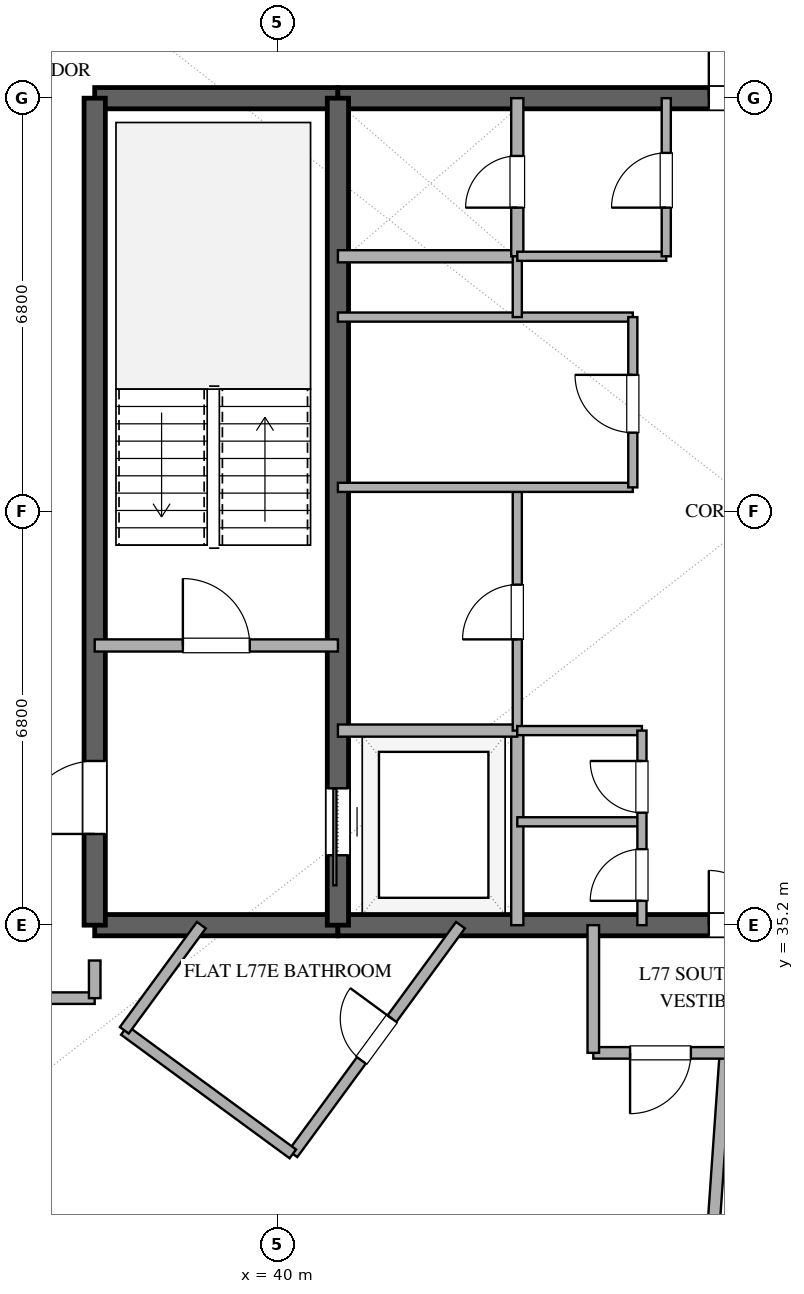
"""IFC4 building model, lengths in metres.
Left out: names, types, materials, properties, quantities, classifications, styles, units other than length and angle.
Written with IfcOpenShell. Run it as: python <this file> out.ifc"""

import sys

from ifc_helpers import new_model, si_unit, direction, frame, frame_2d, origin, place, context, subcontext, project, spatial, rectangle, extrude, element, fill, save


model = new_model("IFC4")
c1 = context("Model", 3, precision=1e-05, world=origin(), true_north=direction((0.0, 1.0)))
c2 = subcontext(c1, "Body", "Model", "MODEL_VIEW")
j1 = project(units=[si_unit("LENGTHUNIT", "METRE"), si_unit("PLANEANGLEUNIT", "RADIAN")], contexts=[c1])
p1 = place(None, origin())
s1 = spatial("IfcSite", under=j1, at=p1, CompositionType="ELEMENT")
p2 = place(p1, origin())
s2 = spatial("IfcBuilding", under=s1, at=p2, CompositionType="ELEMENT")
p3 = place(p2, frame((0.0, 0.0, 298.2)))
s3 = spatial("IfcBuildingStorey", under=s2, at=p3, CompositionType="ELEMENT", Elevation=298.2)
p4 = place(p3, frame((37.0, 35.2, 0.0), z_axis=(0.0, 0.0, 1.0), x_axis=(1.0, 0.0, 0.0)))
e1 = element("IfcWall", 1, at=p4, inside=s3, PredefinedType="SHEAR", context=c2, shape_type="SweptSolid", body=[
    extrude(rectangle(XDim=4.0, YDim=0.35, at=frame_2d((2.0, 0.0))), origin(), (0.0, 0.0, 1.0), 3.37),
])
p5 = place(p3, frame((41.0, 35.2, 0.0), z_axis=(0.0, 0.0, 1.0), x_axis=(1.0, 0.0, 0.0)))
e2 = element("IfcWall", 2, at=p5, inside=s3, PredefinedType="SHEAR", context=c2, shape_type="SweptSolid", body=[
    extrude(rectangle(XDim=14.0, YDim=0.35, at=frame_2d((7.0, 0.0))), origin(), (0.0, 0.0, 1.0), 3.37),
])
p6 = place(p5, frame((6.1, 0.0, 0.0)))
e3 = element("IfcOpeningElement", 3, at=p6, cuts=e2, PredefinedType="OPENING", context=c2, shape_type="SweptSolid", body=[
    extrude(rectangle(XDim=1.8, YDim=2.25, at=frame_2d((0.9, 1.125))), frame((0.0, 0.185, 0.0), z_axis=(0.0, -1.0, 0.0), x_axis=(1.0, 0.0, 0.0)), (0.0, 0.0, 1.0), 0.37),
])
p7 = place(p3, frame((37.0, 48.8, 0.0), z_axis=(0.0, 0.0, 1.0), x_axis=(1.0, 0.0, 0.0)))
e4 = element("IfcWall", 4, at=p7, inside=s3, PredefinedType="SHEAR", context=c2, shape_type="SweptSolid", body=[
    extrude(rectangle(XDim=4.0, YDim=0.35, at=frame_2d((2.0, 0.0))), origin(), (0.0, 0.0, 1.0), 3.37),
])
p8 = place(p3, frame((41.0, 48.8, 0.0), z_axis=(0.0, 0.0, 1.0), x_axis=(1.0, 0.0, 0.0)))
e5 = element("IfcWall", 5, at=p8, inside=s3, PredefinedType="SHEAR", context=c2, shape_type="SweptSolid", body=[
    extrude(rectangle(XDim=14.0, YDim=0.35, at=frame_2d((7.0, 0.0))), origin(), (0.0, 0.0, 1.0), 3.37),
])
p9 = place(p8, frame((6.1, 0.0, 0.0)))
e6 = element("IfcOpeningElement", 6, at=p9, cuts=e5, PredefinedType="OPENING", context=c2, shape_type="SweptSolid", body=[
    extrude(rectangle(XDim=1.8, YDim=2.25, at=frame_2d((0.9, 1.125))), frame((0.0, 0.185, 0.0), z_axis=(0.0, -1.0, 0.0), x_axis=(1.0, 0.0, 0.0)), (0.0, 0.0, 1.0), 0.37),
])
p10 = place(p3, frame((37.0, 35.2, 0.0), z_axis=(0.0, 0.0, 1.0), x_axis=(0.0, 1.0, 0.0)))
e7 = element("IfcWall", 7, at=p10, inside=s3, PredefinedType="SHEAR", context=c2, shape_type="SweptSolid", body=[
    extrude(rectangle(XDim=13.6, YDim=0.35, at=frame_2d((6.8, 0.0))), origin(), (0.0, 0.0, 1.0), 3.37),
])
p11 = place(p10, frame((1.5, 0.0, 0.0)))
e8 = element("IfcOpeningElement", 8, at=p11, cuts=e7, PredefinedType="OPENING", context=c2, shape_type="SweptSolid", body=[
    extrude(rectangle(XDim=1.2, YDim=2.15, at=frame_2d((0.6, 1.075))), frame((0.0, 0.185, 0.0), z_axis=(0.0, -1.0, 0.0), x_axis=(1.0, 0.0, 0.0)), (0.0, 0.0, 1.0), 0.37),
])
p12 = place(p3, frame((41.0, 35.2, 0.0), z_axis=(0.0, 0.0, 1.0), x_axis=(0.0, 1.0, 0.0)))
e9 = element("IfcWall", 9, at=p12, inside=s3, PredefinedType="SHEAR", context=c2, shape_type="SweptSolid", body=[
    extrude(rectangle(XDim=13.6, YDim=0.35, at=frame_2d((6.8, 0.0))), origin(), (0.0, 0.0, 1.0), 3.37),
])
p13 = place(p12, frame((1.15, 0.0, 0.0)))
e10 = element("IfcOpeningElement", 10, at=p13, cuts=e9, PredefinedType="OPENING", context=c2, shape_type="SweptSolid", body=[
    extrude(rectangle(XDim=1.1, YDim=2.2, at=frame_2d((0.55, 1.1))), frame((0.0, 0.185, 0.0), z_axis=(0.0, -1.0, 0.0), x_axis=(1.0, 0.0, 0.0)), (0.0, 0.0, 1.0), 0.37),
])
p14 = place(p3, frame((37.0, 39.8, 0.0), z_axis=(0.0, 0.0, 1.0), x_axis=(1.0, 0.0, 0.0)))
e11 = element("IfcWall", 11, at=p14, inside=s3, PredefinedType="SOLIDWALL", context=c2, shape_type="SweptSolid", body=[
    extrude(rectangle(XDim=4.0, YDim=0.2, at=frame_2d((2.0, 0.0))), origin(), (0.0, 0.0, 1.0), 2.73),
])
p15 = place(p14, frame((1.45, 0.0, 0.0)))
e12 = element("IfcOpeningElement", 12, at=p15, cuts=e11, PredefinedType="OPENING", context=c2, shape_type="SweptSolid", body=[
    extrude(rectangle(XDim=1.1, YDim=2.15, at=frame_2d((0.55, 1.075))), frame((0.0, 0.11, 0.0), z_axis=(0.0, -1.0, 0.0), x_axis=(1.0, 0.0, 0.0)), (0.0, 0.0, 1.0), 0.22),
])
p16 = place(p3, frame((43.95, 35.2, 0.0), z_axis=(0.0, 0.0, 1.0), x_axis=(0.0, 1.0, 0.0)))
e13 = element("IfcWall", 13, at=p16, inside=s3, PredefinedType="SOLIDWALL", context=c2, shape_type="SweptSolid", body=[
    extrude(rectangle(XDim=3.2, YDim=0.2, at=frame_2d((1.6, 0.0))), origin(), (0.0, 0.0, 1.0), 2.73),
])
for number, where, z_axis, x_axis in (
    (14, (41.0, 38.4, 0.0), (0.0, 0.0, 1.0), (1.0, 0.0, 0.0)),
    (15, (41.0, 46.2, 0.0), (0.0, 0.0, 1.0), (1.0, 0.0, 0.0)),
):
    element("IfcWall", number, at=place(p3, frame(where, z_axis=z_axis, x_axis=x_axis)), inside=s3, PredefinedType="SOLIDWALL", context=c2, shape_type="SweptSolid", body=[
        extrude(rectangle(XDim=2.95, YDim=0.2, at=frame_2d((1.475, 0.0))), origin(), (0.0, 0.0, 1.0), 2.73),
    ])
p17 = place(p3, frame((43.95, 46.2, 0.0), z_axis=(0.0, 0.0, 1.0), x_axis=(0.0, 1.0, 0.0)))
e16 = element("IfcWall", 16, at=p17, inside=s3, PredefinedType="SOLIDWALL", context=c2, shape_type="SweptSolid", body=[
    extrude(rectangle(XDim=2.6, YDim=0.2, at=frame_2d((1.3, 0.0))), origin(), (0.0, 0.0, 1.0), 2.73),
])
p18 = place(p17, frame((0.8, 0.0, 0.0)))
e17 = element("IfcOpeningElement", 17, at=p18, cuts=e16, PredefinedType="OPENING", context=c2, shape_type="SweptSolid", body=[
    extrude(rectangle(XDim=0.85, YDim=2.15, at=frame_2d((0.425, 1.075))), frame((0.0, 0.11, 0.0), z_axis=(0.0, -1.0, 0.0), x_axis=(1.0, 0.0, 0.0)), (0.0, 0.0, 1.0), 0.22),
])
p19 = place(p3, frame((43.95, 38.4, 0.0), z_axis=(0.0, 0.0, 1.0), x_axis=(0.0, 1.0, 0.0)))
e18 = element("IfcWall", 18, at=p19, inside=s3, PredefinedType="PARTITIONING", context=c2, shape_type="SweptSolid", body=[
    extrude(rectangle(XDim=4.0, YDim=0.15, at=frame_2d((2.0, 0.0))), origin(), (0.0, 0.0, 1.0), 2.73),
])
p20 = place(p19, frame((1.5, 0.0, 0.0)))
e19 = element("IfcOpeningElement", 19, at=p20, cuts=e18, PredefinedType="OPENING", context=c2, shape_type="SweptSolid", body=[
    extrude(rectangle(XDim=0.9, YDim=2.15, at=frame_2d((0.45, 1.075))), frame((0.0, 0.085, 0.0), z_axis=(0.0, -1.0, 0.0), x_axis=(1.0, 0.0, 0.0)), (0.0, 0.0, 1.0), 0.17),
])
for number, where, z_axis, x_axis in (
    (20, (41.0, 42.4, 0.0), (0.0, 0.0, 1.0), (1.0, 0.0, 0.0)),
    (21, (41.0, 45.2, 0.0), (0.0, 0.0, 1.0), (1.0, 0.0, 0.0)),
):
    element("IfcWall", number, at=place(p3, frame(where, z_axis=z_axis, x_axis=x_axis)), inside=s3, PredefinedType="PARTITIONING", context=c2, shape_type="SweptSolid", body=[
        extrude(rectangle(XDim=4.85, YDim=0.15, at=frame_2d((2.425, 0.0))), origin(), (0.0, 0.0, 1.0), 2.73),
    ])
p21 = place(p3, frame((43.95, 45.2, 0.0), z_axis=(0.0, 0.0, 1.0), x_axis=(0.0, 1.0, 0.0)))
e22 = element("IfcWall", 22, at=p21, inside=s3, PredefinedType="PARTITIONING", context=c2, shape_type="SweptSolid", body=[
    extrude(rectangle(XDim=1.0, YDim=0.15, at=frame_2d((0.5, 0.0))), origin(), (0.0, 0.0, 1.0), 2.73),
])
p22 = place(p3, frame((45.85, 42.4, 0.0), z_axis=(0.0, 0.0, 1.0), x_axis=(0.0, 1.0, 0.0)))
e23 = element("IfcWall", 23, at=p22, inside=s3, PredefinedType="PARTITIONING", context=c2, shape_type="SweptSolid", body=[
    extrude(rectangle(XDim=2.8, YDim=0.15, at=frame_2d((1.4, 0.0))), origin(), (0.0, 0.0, 1.0), 2.73),
])
p23 = place(p22, frame((0.9, 0.0, 0.0)))
e24 = element("IfcOpeningElement", 24, at=p23, cuts=e23, PredefinedType="OPENING", context=c2, shape_type="SweptSolid", body=[
    extrude(rectangle(XDim=0.95, YDim=2.15, at=frame_2d((0.475, 1.075))), frame((0.0, 0.085, 0.0), z_axis=(0.0, -1.0, 0.0), x_axis=(1.0, 0.0, 0.0)), (0.0, 0.0, 1.0), 0.17),
])
for number, where, z_axis, x_axis in (
    (25, (43.95, 36.9, 0.0), (0.0, 0.0, 1.0), (1.0, 0.0, 0.0)),
    (26, (43.95, 38.4, 0.0), (0.0, 0.0, 1.0), (1.0, 0.0, 0.0)),
):
    element("IfcWall", number, at=place(p3, frame(where, z_axis=z_axis, x_axis=x_axis)), inside=s3, PredefinedType="PARTITIONING", context=c2, shape_type="SweptSolid", body=[
        extrude(rectangle(XDim=2.05, YDim=0.15, at=frame_2d((1.025, 0.0))), origin(), (0.0, 0.0, 1.0), 2.73),
    ])
p24 = place(p3, frame((46.0, 35.2, 0.0), z_axis=(0.0, 0.0, 1.0), x_axis=(0.0, 1.0, 0.0)))
e27 = element("IfcWall", 27, at=p24, inside=s3, PredefinedType="PARTITIONING", context=c2, shape_type="SweptSolid", body=[
    extrude(rectangle(XDim=3.2, YDim=0.15, at=frame_2d((1.6, 0.0))), origin(), (0.0, 0.0, 1.0), 2.73),
])
p25 = place(p24, frame((0.4, 0.0, 0.0)))
e28 = element("IfcOpeningElement", 28, at=p25, cuts=e27, PredefinedType="OPENING", context=c2, shape_type="SweptSolid", body=[
    extrude(rectangle(XDim=0.85, YDim=2.15, at=frame_2d((0.425, 1.075))), frame((0.0, 0.085, 0.0), z_axis=(0.0, -1.0, 0.0), x_axis=(1.0, 0.0, 0.0)), (0.0, 0.0, 1.0), 0.17),
])
p26 = place(p24, frame((1.85, 0.0, 0.0)))
e29 = element("IfcOpeningElement", 29, at=p26, cuts=e27, PredefinedType="OPENING", context=c2, shape_type="SweptSolid", body=[
    extrude(rectangle(XDim=0.85, YDim=2.15, at=frame_2d((0.425, 1.075))), frame((0.0, 0.085, 0.0), z_axis=(0.0, -1.0, 0.0), x_axis=(1.0, 0.0, 0.0)), (0.0, 0.0, 1.0), 0.17),
])
p27 = place(p3, frame((43.95, 46.2, 0.0), z_axis=(0.0, 0.0, 1.0), x_axis=(1.0, 0.0, 0.0)))
e30 = element("IfcWall", 30, at=p27, inside=s3, PredefinedType="PARTITIONING", context=c2, shape_type="SweptSolid", body=[
    extrude(rectangle(XDim=2.45, YDim=0.15, at=frame_2d((1.225, 0.0))), origin(), (0.0, 0.0, 1.0), 2.73),
])
p28 = place(p3, frame((46.4, 46.2, 0.0), z_axis=(0.0, 0.0, 1.0), x_axis=(0.0, 1.0, 0.0)))
e31 = element("IfcWall", 31, at=p28, inside=s3, PredefinedType="PARTITIONING", context=c2, shape_type="SweptSolid", body=[
    extrude(rectangle(XDim=2.6, YDim=0.15, at=frame_2d((1.3, 0.0))), origin(), (0.0, 0.0, 1.0), 2.73),
])
p29 = place(p28, frame((0.8, 0.0, 0.0)))
e32 = element("IfcOpeningElement", 32, at=p29, cuts=e31, PredefinedType="OPENING", context=c2, shape_type="SweptSolid", body=[
    extrude(rectangle(XDim=0.9, YDim=2.15, at=frame_2d((0.45, 1.075))), frame((0.0, 0.085, 0.0), z_axis=(0.0, -1.0, 0.0), x_axis=(1.0, 0.0, 0.0)), (0.0, 0.0, 1.0), 0.17),
])
p30 = place(p3, frame((47.378, 33.1, 0.0), z_axis=(0.0, 0.0, 1.0), x_axis=(-0.069765360577, -0.997563428792, 0.0)))
e33 = element("IfcWall", 33, at=p30, inside=s3, PredefinedType="PARTITIONING", context=c2, shape_type="SweptSolid", body=[
    extrude(rectangle(XDim=10.82, YDim=0.2, at=frame_2d((5.41, 0.0))), origin(), (0.0, 0.0, 1.0), 2.73),
])
p31 = place(p3, frame((37.63, 27.852, 0.0), z_axis=(0.0, 0.0, 1.0), x_axis=(-0.896847493932, 0.442339883605, 0.0)))
e34 = element("IfcWall", 34, at=p31, inside=s3, PredefinedType="PLUMBINGWALL", context=c2, shape_type="SweptSolid", body=[
    extrude(rectangle(XDim=5.959, YDim=0.16, at=frame_2d((2.979, 0.0))), origin(), (0.0, 0.0, 1.0), 2.73),
])
p32 = place(p31, frame((2.53, 0.0, 0.0)))
e35 = element("IfcOpeningElement", 35, at=p32, cuts=e34, PredefinedType="OPENING", context=c2, shape_type="SweptSolid", body=[
    extrude(rectangle(XDim=0.9, YDim=2.1, at=frame_2d((0.45, 1.05))), frame((0.0, 0.09, 0.0), z_axis=(0.0, -1.0, 0.0), x_axis=(1.0, 0.0, 0.0)), (0.0, 0.0, 1.0), 0.18),
])
p33 = place(p3, frame((40.259, 31.439, 0.0), z_axis=(0.0, 0.0, 1.0), x_axis=(0.591168457908, 0.806548110391, 0.0)))
e36 = element("IfcWall", 36, at=p33, inside=s3, PredefinedType="PLUMBINGWALL", context=c2, shape_type="SweptSolid", body=[
    extrude(rectangle(XDim=4.663, YDim=0.18, at=frame_2d((2.332, 0.0))), origin(), (0.0, 0.0, 1.0), 2.73),
])
p34 = place(p33, frame((1.907, 0.0, 0.0)))
e37 = element("IfcOpeningElement", 37, at=p34, cuts=e36, PredefinedType="OPENING", context=c2, shape_type="SweptSolid", body=[
    extrude(rectangle(XDim=0.85, YDim=2.1, at=frame_2d((0.425, 1.05))), frame((0.0, 0.1, 0.0), z_axis=(0.0, -1.0, 0.0), x_axis=(1.0, 0.0, 0.0)), (0.0, 0.0, 1.0), 0.2),
])
p35 = place(p3, frame((50.8, 33.1, 0.0), z_axis=(0.0, 0.0, 1.0), x_axis=(-1.0, 0.0, 0.0)))
e38 = element("IfcWall", 38, at=p35, inside=s3, PredefinedType="PARTITIONING", context=c2, shape_type="SweptSolid", body=[
    extrude(rectangle(XDim=5.6, YDim=0.19, at=frame_2d((2.8, 0.0))), origin(), (0.0, 0.0, 1.0), 2.73),
])
p36 = place(p35, frame((1.227, 0.0, 0.0)))
e39 = element("IfcOpeningElement", 39, at=p36, cuts=e38, PredefinedType="OPENING", context=c2, shape_type="SweptSolid", body=[
    extrude(rectangle(XDim=1.0, YDim=2.2, at=frame_2d((0.5, 1.1))), frame((0.0, 0.105, 0.0), z_axis=(0.0, -1.0, 0.0), x_axis=(1.0, 0.0, 0.0)), (0.0, 0.0, 1.0), 0.21),
])
p37 = place(p35, frame((3.995, 0.0, 0.0)))
e40 = element("IfcOpeningElement", 40, at=p37, cuts=e38, PredefinedType="OPENING", context=c2, shape_type="SweptSolid", body=[
    extrude(rectangle(XDim=1.0, YDim=2.2, at=frame_2d((0.5, 1.1))), frame((0.0, 0.105, 0.0), z_axis=(0.0, -1.0, 0.0), x_axis=(1.0, 0.0, 0.0)), (0.0, 0.0, 1.0), 0.21),
])
p38 = place(p3, frame((37.486, 33.471, 0.0), z_axis=(0.0, 0.0, 1.0), x_axis=(0.80655624282, -0.59115736244, 0.0)))
e41 = element("IfcWall", 41, at=p38, inside=s3, PredefinedType="PLUMBINGWALL", context=c2, shape_type="SweptSolid", body=[
    extrude(rectangle(XDim=3.438, YDim=0.18, at=frame_2d((1.719, 0.0))), origin(), (0.0, 0.0, 1.0), 2.73),
])
p39 = place(p3, frame((38.754, 35.2, 0.0), z_axis=(0.0, 0.0, 1.0), x_axis=(-0.591255046212, -0.806484637379, 0.0)))
e42 = element("IfcWall", 42, at=p39, inside=s3, PredefinedType="PLUMBINGWALL", context=c2, shape_type="SweptSolid", body=[
    extrude(rectangle(XDim=2.144, YDim=0.18, at=frame_2d((1.072, 0.0))), origin(), (0.0, 0.0, 1.0), 2.73),
])
p40 = place(p3, frame((45.2, 33.1, 0.0), z_axis=(0.0, 0.0, 1.0), x_axis=(0.0, 1.0, 0.0)))
e43 = element("IfcWall", 43, at=p40, inside=s3, PredefinedType="PARTITIONING", context=c2, shape_type="SweptSolid", body=[
    extrude(rectangle(XDim=2.1, YDim=0.19, at=frame_2d((1.05, 0.0))), origin(), (0.0, 0.0, 1.0), 2.73),
])
p41 = place(p3, frame((37.0, 34.0, 0.0), z_axis=(0.0, 0.0, 1.0), x_axis=(-1.0, 0.0, 0.0)))
e44 = element("IfcWall", 44, at=p41, inside=s3, PredefinedType="PARTITIONING", context=c2, shape_type="SweptSolid", body=[
    extrude(rectangle(XDim=2.2, YDim=0.19, at=frame_2d((1.1, 0.0))), origin(), (0.0, 0.0, 1.0), 2.73),
])
p42 = place(p3, frame((37.0, 34.619, 0.0), z_axis=(0.0, 0.0, 1.0), x_axis=(0.0, -1.0, 0.0)))
e45 = element("IfcWall", 45, at=p42, inside=s3, PredefinedType="PARTITIONING", context=c2, shape_type="SweptSolid", body=[
    extrude(rectangle(XDim=0.619, YDim=0.19, at=frame_2d((0.31, 0.0))), origin(), (0.0, 0.0, 1.0), 2.73),
])
p43 = place(p13, origin())
e46 = element("IfcDoor", 46, at=p43, inside=s3, OperationType="SLIDING_TO_LEFT", PredefinedType="DOOR", context=c2, shape_type="SweptSolid", body=[
    extrude(rectangle(XDim=1.1, YDim=2.2, at=frame_2d((0.55, 1.1))), frame((0.0, 0.025, 0.0), z_axis=(0.0, -1.0, 0.0), x_axis=(1.0, 0.0, 0.0)), (0.0, 0.0, 1.0), 0.05),
])
fill(e10, e46)
p44 = place(p11, origin())
e47 = element("IfcDoor", 47, at=p44, inside=s3, OperationType="SINGLE_SWING_LEFT", PredefinedType="DOOR", context=c2, shape_type="SweptSolid", body=[
    extrude(rectangle(XDim=1.2, YDim=2.15, at=frame_2d((0.6, 1.075))), frame((0.0, 0.025, 0.0), z_axis=(0.0, -1.0, 0.0), x_axis=(1.0, 0.0, 0.0)), (0.0, 0.0, 1.0), 0.05),
])
fill(e8, e47)
p45 = place(p6, origin())
e48 = element("IfcDoor", 48, at=p45, inside=s3, OperationType="DOUBLE_DOOR_SINGLE_SWING", PredefinedType="DOOR", context=c2, shape_type="SweptSolid", body=[
    extrude(rectangle(XDim=1.8, YDim=2.25, at=frame_2d((0.9, 1.125))), frame((0.0, 0.025, 0.0), z_axis=(0.0, -1.0, 0.0), x_axis=(1.0, 0.0, 0.0)), (0.0, 0.0, 1.0), 0.05),
])
fill(e3, e48)
p46 = place(p9, origin())
e49 = element("IfcDoor", 49, at=p46, inside=s3, OperationType="DOUBLE_DOOR_SINGLE_SWING", PredefinedType="DOOR", context=c2, shape_type="SweptSolid", body=[
    extrude(rectangle(XDim=1.8, YDim=2.25, at=frame_2d((0.9, 1.125))), frame((0.0, 0.025, 0.0), z_axis=(0.0, -1.0, 0.0), x_axis=(1.0, 0.0, 0.0)), (0.0, 0.0, 1.0), 0.05),
])
fill(e6, e49)
p47 = place(p15, origin())
e50 = element("IfcDoor", 50, at=p47, inside=s3, OperationType="SINGLE_SWING_LEFT", PredefinedType="DOOR", context=c2, shape_type="SweptSolid", body=[
    extrude(rectangle(XDim=1.1, YDim=2.15, at=frame_2d((0.55, 1.075))), frame((0.0, 0.025, 0.0), z_axis=(0.0, -1.0, 0.0), x_axis=(1.0, 0.0, 0.0)), (0.0, 0.0, 1.0), 0.05),
])
fill(e12, e50)
p48 = place(p18, origin())
e51 = element("IfcDoor", 51, at=p48, inside=s3, OperationType="SINGLE_SWING_LEFT", PredefinedType="DOOR", context=c2, shape_type="SweptSolid", body=[
    extrude(rectangle(XDim=0.85, YDim=2.15, at=frame_2d((0.425, 1.075))), frame((0.0, 0.025, 0.0), z_axis=(0.0, -1.0, 0.0), x_axis=(1.0, 0.0, 0.0)), (0.0, 0.0, 1.0), 0.05),
])
fill(e17, e51)
p49 = place(p20, origin())
e52 = element("IfcDoor", 52, at=p49, inside=s3, OperationType="SINGLE_SWING_LEFT", PredefinedType="DOOR", context=c2, shape_type="SweptSolid", body=[
    extrude(rectangle(XDim=0.9, YDim=2.15, at=frame_2d((0.45, 1.075))), frame((0.0, 0.025, 0.0), z_axis=(0.0, -1.0, 0.0), x_axis=(1.0, 0.0, 0.0)), (0.0, 0.0, 1.0), 0.05),
])
fill(e19, e52)
p50 = place(p23, origin())
e53 = element("IfcDoor", 53, at=p50, inside=s3, OperationType="SINGLE_SWING_RIGHT", PredefinedType="DOOR", context=c2, shape_type="SweptSolid", body=[
    extrude(rectangle(XDim=0.95, YDim=2.15, at=frame_2d((0.475, 1.075))), frame((0.0, 0.025, 0.0), z_axis=(0.0, -1.0, 0.0), x_axis=(1.0, 0.0, 0.0)), (0.0, 0.0, 1.0), 0.05),
])
fill(e24, e53)
p51 = place(p25, origin())
e54 = element("IfcDoor", 54, at=p51, inside=s3, OperationType="SINGLE_SWING_LEFT", PredefinedType="DOOR", context=c2, shape_type="SweptSolid", body=[
    extrude(rectangle(XDim=0.85, YDim=2.15, at=frame_2d((0.425, 1.075))), frame((0.0, 0.025, 0.0), z_axis=(0.0, -1.0, 0.0), x_axis=(1.0, 0.0, 0.0)), (0.0, 0.0, 1.0), 0.05),
])
fill(e28, e54)
p52 = place(p26, origin())
e55 = element("IfcDoor", 55, at=p52, inside=s3, OperationType="SINGLE_SWING_RIGHT", PredefinedType="DOOR", context=c2, shape_type="SweptSolid", body=[
    extrude(rectangle(XDim=0.85, YDim=2.15, at=frame_2d((0.425, 1.075))), frame((0.0, 0.025, 0.0), z_axis=(0.0, -1.0, 0.0), x_axis=(1.0, 0.0, 0.0)), (0.0, 0.0, 1.0), 0.05),
])
fill(e29, e55)
p53 = place(p29, origin())
e56 = element("IfcDoor", 56, at=p53, inside=s3, OperationType="SINGLE_SWING_LEFT", PredefinedType="DOOR", context=c2, shape_type="SweptSolid", body=[
    extrude(rectangle(XDim=0.9, YDim=2.15, at=frame_2d((0.45, 1.075))), frame((0.0, 0.025, 0.0), z_axis=(0.0, -1.0, 0.0), x_axis=(1.0, 0.0, 0.0)), (0.0, 0.0, 1.0), 0.05),
])
fill(e32, e56)
p54 = place(p34, origin())
e57 = element("IfcDoor", 57, at=p54, inside=s3, OperationType="SINGLE_SWING_RIGHT", PredefinedType="DOOR", context=c2, shape_type="SweptSolid", body=[
    extrude(rectangle(XDim=0.85, YDim=2.1, at=frame_2d((0.425, 1.05))), frame((0.0, 0.025, 0.0), z_axis=(0.0, -1.0, 0.0), x_axis=(1.0, 0.0, 0.0)), (0.0, 0.0, 1.0), 0.05),
])
fill(e37, e57)
p55 = place(p37, origin())
e58 = element("IfcDoor", 58, at=p55, inside=s3, OperationType="SINGLE_SWING_RIGHT", PredefinedType="DOOR", context=c2, shape_type="SweptSolid", body=[
    extrude(rectangle(XDim=1.0, YDim=2.2, at=frame_2d((0.5, 1.1))), frame((0.0, 0.025, 0.0), z_axis=(0.0, -1.0, 0.0), x_axis=(1.0, 0.0, 0.0)), (0.0, 0.0, 1.0), 0.05),
])
fill(e40, e58)
save(model, sys.argv[1])
